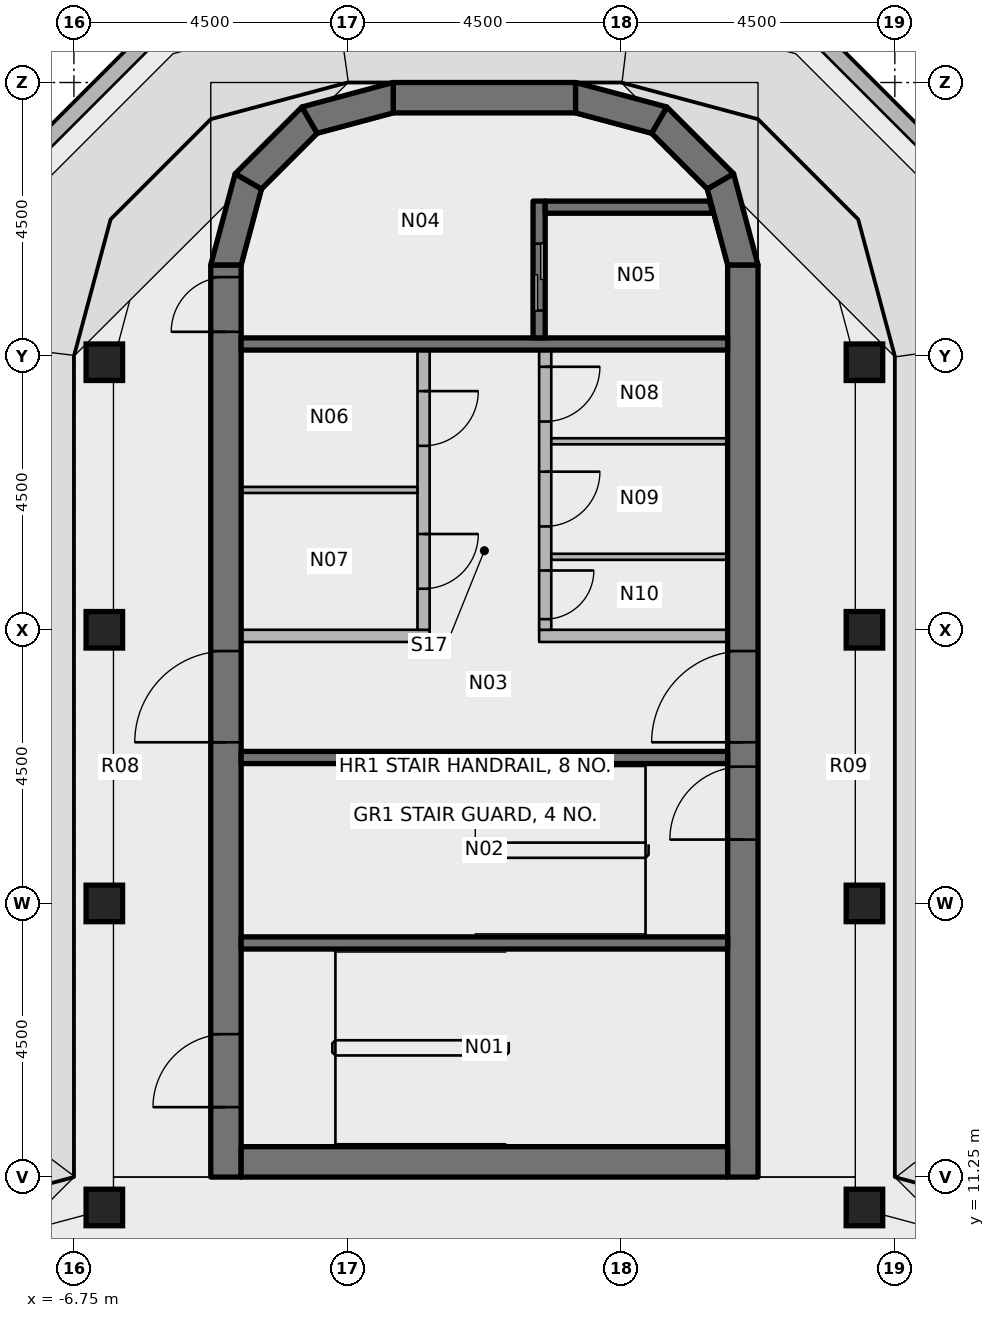
"""IFC4 building model, lengths in metres.
Left out: names, types, materials, properties, quantities, classifications, styles, units other than length and angle.
Written with IfcOpenShell. Run it as: python <this file> out.ifc"""

import sys

from ifc_helpers import new_model, si_unit, direction, frame, frame_2d, origin, origin_2d, place, context, subcontext, project, spatial, polyline, rectangle, outline, extrude, element, fill, save


model = new_model("IFC4")
c1 = context("Model", 3, precision=1e-05, world=origin(), true_north=direction((0.0, 1.0)))
c2 = subcontext(c1, "Body", "Model", "MODEL_VIEW")
j1 = project(units=[si_unit("LENGTHUNIT", "METRE"), si_unit("PLANEANGLEUNIT", "RADIAN")], contexts=[c1])
p1 = place(None, origin())
s1 = spatial("IfcSite", under=j1, at=p1, CompositionType="ELEMENT")
p2 = place(p1, origin())
s2 = spatial("IfcBuilding", under=s1, at=p2, CompositionType="ELEMENT")
p3 = place(p2, frame((0.0, 0.0, 302.4)))
s3 = spatial("IfcBuildingStorey", under=s2, at=p3, CompositionType="ELEMENT", Elevation=302.4)
for number, where, z_axis, x_axis in (
    (1, (-6.25, 10.75, 0.0), (0.0, 0.0, 1.0), (1.0, 0.0, 0.0)),
    (2, (-6.25, 15.75, 0.0), (0.0, 0.0, 1.0), (1.0, 0.0, 0.0)),
    (3, (-6.25, 20.25, 0.0), (0.0, 0.0, 1.0), (1.0, 0.0, 0.0)),
    (4, (-6.25, 24.65, 0.0), (0.0, 0.0, 1.0), (1.0, 0.0, 0.0)),
    (5, (6.25, 10.75, 0.0), (0.0, 0.0, 1.0), (1.0, 0.0, 0.0)),
    (6, (6.25, 15.75, 0.0), (0.0, 0.0, 1.0), (1.0, 0.0, 0.0)),
    (7, (6.25, 20.25, 0.0), (0.0, 0.0, 1.0), (1.0, 0.0, 0.0)),
    (8, (6.25, 24.65, 0.0), (0.0, 0.0, 1.0), (1.0, 0.0, 0.0)),
):
    element("IfcColumn", number, at=place(p3, frame(where, z_axis=z_axis, x_axis=x_axis)), inside=s3, PredefinedType="COLUMN", context=c2, shape_type="SweptSolid", body=[
        extrude(rectangle(XDim=0.6, YDim=0.6, at=origin_2d()), origin(), (0.0, 0.0, 1.0), 3.45),
    ])
p4 = place(p3, frame((-4.25, 11.25, 0.0), z_axis=(0.0, 0.0, 1.0), x_axis=(0.0, 1.0, 0.0)))
e9 = element("IfcWall", 9, at=p4, inside=s3, PredefinedType="SHEAR", context=c2, shape_type="SweptSolid", body=[
    extrude(rectangle(XDim=15.0, YDim=0.5, at=frame_2d((7.5, 0.0))), origin(), (0.0, 0.0, 1.0), 3.6),
])
p5 = place(p4, frame((7.15, 0.0, 0.0)))
e10 = element("IfcOpeningElement", 10, at=p5, cuts=e9, PredefinedType="OPENING", context=c2, shape_type="SweptSolid", body=[
    extrude(rectangle(XDim=1.5, YDim=2.3, at=frame_2d((0.75, 1.15))), frame((0.0, 0.26, 0.0), z_axis=(0.0, -1.0, 0.0), x_axis=(1.0, 0.0, 0.0)), (0.0, 0.0, 1.0), 0.52),
])
p6 = place(p4, frame((13.9, 0.0, 0.0)))
e11 = element("IfcOpeningElement", 11, at=p6, cuts=e9, PredefinedType="OPENING", context=c2, shape_type="SweptSolid", body=[
    extrude(rectangle(XDim=0.9, YDim=2.1, at=frame_2d((0.45, 1.05))), frame((0.0, 0.26, 0.0), z_axis=(0.0, -1.0, 0.0), x_axis=(1.0, 0.0, 0.0)), (0.0, 0.0, 1.0), 0.52),
])
p7 = place(p4, frame((1.15, 0.0, 0.0)))
e12 = element("IfcOpeningElement", 12, at=p7, cuts=e9, PredefinedType="OPENING", context=c2, shape_type="SweptSolid", body=[
    extrude(rectangle(XDim=1.2, YDim=2.1, at=frame_2d((0.6, 1.05))), frame((0.0, 0.26, 0.0), z_axis=(0.0, -1.0, 0.0), x_axis=(1.0, 0.0, 0.0)), (0.0, 0.0, 1.0), 0.52),
])
p8 = place(p3, frame((4.25, 11.25, 0.0), z_axis=(0.0, 0.0, 1.0), x_axis=(0.0, 1.0, 0.0)))
e13 = element("IfcWall", 13, at=p8, inside=s3, PredefinedType="SHEAR", context=c2, shape_type="SweptSolid", body=[
    extrude(rectangle(XDim=15.0, YDim=0.5, at=frame_2d((7.5, 0.0))), origin(), (0.0, 0.0, 1.0), 3.6),
])
p9 = place(p8, frame((7.15, 0.0, 0.0)))
e14 = element("IfcOpeningElement", 14, at=p9, cuts=e13, PredefinedType="OPENING", context=c2, shape_type="SweptSolid", body=[
    extrude(rectangle(XDim=1.5, YDim=2.3, at=frame_2d((0.75, 1.15))), frame((0.0, 0.26, 0.0), z_axis=(0.0, -1.0, 0.0), x_axis=(1.0, 0.0, 0.0)), (0.0, 0.0, 1.0), 0.52),
])
p10 = place(p8, frame((5.55, 0.0, 0.0)))
e15 = element("IfcOpeningElement", 15, at=p10, cuts=e13, PredefinedType="OPENING", context=c2, shape_type="SweptSolid", body=[
    extrude(rectangle(XDim=1.2, YDim=2.1, at=frame_2d((0.6, 1.05))), frame((0.0, 0.26, 0.0), z_axis=(0.0, -1.0, 0.0), x_axis=(1.0, 0.0, 0.0)), (0.0, 0.0, 1.0), 0.52),
])
p11 = place(p3, frame((-4.0, 11.5, 0.0), z_axis=(0.0, 0.0, 1.0), x_axis=(1.0, 0.0, 0.0)))
e16 = element("IfcWall", 16, at=p11, inside=s3, PredefinedType="SHEAR", context=c2, shape_type="SweptSolid", body=[
    extrude(rectangle(XDim=8.0, YDim=0.5, at=frame_2d((4.0, 0.0))), origin(), (0.0, 0.0, 1.0), 3.6),
])
p12 = place(p3, frame((-1.5, 29.0, 0.0), z_axis=(0.0, 0.0, 1.0), x_axis=(1.0, 0.0, 0.0)))
e17 = element("IfcWall", 17, at=p12, inside=s3, PredefinedType="SHEAR", context=c2, shape_type="SweptSolid", body=[
    extrude(rectangle(XDim=3.0, YDim=0.5, at=frame_2d((1.5, 0.0))), origin(), (0.0, 0.0, 1.0), 3.6),
])
p13 = place(p3, origin())
e18 = element("IfcWall", 18, at=p13, inside=s3, PredefinedType="SHEAR", context=c2, shape_type="SweptSolid", body=[
    extrude(outline(polyline([(-4.5, 26.25), (-4.098, 27.75), (-3.665, 27.5), (-4.0, 26.25), (-4.5, 26.25)])), origin(), (0.0, 0.0, 1.0), 3.6),
])
p14 = place(p3, origin())
e19 = element("IfcWall", 19, at=p14, inside=s3, PredefinedType="SHEAR", context=c2, shape_type="SweptSolid", body=[
    extrude(outline(polyline([(-4.098, 27.75), (-3.0, 28.848), (-2.75, 28.415), (-3.665, 27.5), (-4.098, 27.75)])), origin(), (0.0, 0.0, 1.0), 3.6),
])
p15 = place(p3, origin())
e20 = element("IfcWall", 20, at=p15, inside=s3, PredefinedType="SHEAR", context=c2, shape_type="SweptSolid", body=[
    extrude(outline(polyline([(-3.0, 28.848), (-1.5, 29.25), (-1.5, 28.75), (-2.75, 28.415), (-3.0, 28.848)])), origin(), (0.0, 0.0, 1.0), 3.6),
])
p16 = place(p3, origin())
e21 = element("IfcWall", 21, at=p16, inside=s3, PredefinedType="SHEAR", context=c2, shape_type="SweptSolid", body=[
    extrude(outline(polyline([(4.5, 26.25), (4.098, 27.75), (3.665, 27.5), (4.0, 26.25), (4.5, 26.25)])), origin(), (0.0, 0.0, 1.0), 3.6),
])
p17 = place(p3, origin())
e22 = element("IfcWall", 22, at=p17, inside=s3, PredefinedType="SHEAR", context=c2, shape_type="SweptSolid", body=[
    extrude(outline(polyline([(4.098, 27.75), (3.0, 28.848), (2.75, 28.415), (3.665, 27.5), (4.098, 27.75)])), origin(), (0.0, 0.0, 1.0), 3.6),
])
p18 = place(p3, origin())
e23 = element("IfcWall", 23, at=p18, inside=s3, PredefinedType="SHEAR", context=c2, shape_type="SweptSolid", body=[
    extrude(outline(polyline([(3.0, 28.848), (1.5, 29.25), (1.5, 28.75), (2.75, 28.415), (3.0, 28.848)])), origin(), (0.0, 0.0, 1.0), 3.6),
])
p19 = place(p3, origin())
e24 = element("IfcWall", 24, at=p19, inside=s3, PredefinedType="PARAPET", context=c2, shape_type="SweptSolid", body=[
    extrude(outline(polyline([(-7.743, 27.921), (-5.421, 30.243), (-5.292, 30.019), (-7.519, 27.792), (-7.743, 27.921)])), origin(), (0.0, 0.0, 1.0), 1.22),
])
p20 = place(p3, origin())
e25 = element("IfcWall", 25, at=p20, inside=s3, PredefinedType="PARAPET", context=c2, shape_type="SweptSolid", body=[
    extrude(outline(polyline([(5.421, 30.243), (7.743, 27.921), (7.519, 27.792), (5.292, 30.019), (5.421, 30.243)])), origin(), (0.0, 0.0, 1.0), 1.22),
])
p21 = place(p3, frame((-4.0, 24.95, 0.0), z_axis=(0.0, 0.0, 1.0), x_axis=(1.0, 0.0, 0.0)))
e26 = element("IfcWall", 26, at=p21, inside=s3, PredefinedType="SHEAR", context=c2, shape_type="SweptSolid", body=[
    extrude(rectangle(XDim=8.0, YDim=0.2, at=frame_2d((4.0, 0.0))), origin(), (0.0, 0.0, 1.0), 3.45),
])
p22 = place(p3, frame((0.9, 27.3, 0.0), z_axis=(0.0, 0.0, 1.0), x_axis=(0.0, -1.0, 0.0)))
e27 = element("IfcWall", 27, at=p22, inside=s3, PredefinedType="SHEAR", context=c2, shape_type="SweptSolid", body=[
    extrude(rectangle(XDim=2.25, YDim=0.2, at=frame_2d((1.125, 0.0))), origin(), (0.0, 0.0, 1.0), 3.45),
])
p23 = place(p22, frame((0.7, 0.0, 0.0)))
e28 = element("IfcOpeningElement", 28, at=p23, cuts=e27, PredefinedType="OPENING", context=c2, shape_type="SweptSolid", body=[
    extrude(rectangle(XDim=1.1, YDim=2.3, at=frame_2d((0.55, 1.15))), frame((0.0, 0.11, 0.0), z_axis=(0.0, -1.0, 0.0), x_axis=(1.0, 0.0, 0.0)), (0.0, 0.0, 1.0), 0.22),
])
p24 = place(p3, origin())
e29 = element("IfcWall", 29, at=p24, inside=s3, PredefinedType="SHEAR", context=c2, shape_type="SweptSolid", body=[
    extrude(outline(polyline([(1.0, 27.1), (3.755, 27.1), (3.701, 27.3), (1.0, 27.3), (1.0, 27.1)])), origin(), (0.0, 0.0, 1.0), 3.45),
])
for number, where, z_axis, x_axis in (
    (30, (-4.0, 18.15, 0.0), (0.0, 0.0, 1.0), (1.0, 0.0, 0.0)),
    (31, (-4.0, 15.1, 0.0), (0.0, 0.0, 1.0), (1.0, 0.0, 0.0)),
):
    element("IfcWall", number, at=place(p3, frame(where, z_axis=z_axis, x_axis=x_axis)), inside=s3, PredefinedType="SHEAR", context=c2, shape_type="SweptSolid", body=[
        extrude(rectangle(XDim=8.0, YDim=0.2, at=frame_2d((4.0, 0.0))), origin(), (0.0, 0.0, 1.0), 3.45),
    ])
p25 = place(p3, frame((-4.0, 20.15, 0.0), z_axis=(0.0, 0.0, 1.0), x_axis=(1.0, 0.0, 0.0)))
e32 = element("IfcWall", 32, at=p25, inside=s3, PredefinedType="PARTITIONING", context=c2, shape_type="SweptSolid", body=[
    extrude(rectangle(XDim=3.1, YDim=0.2, at=frame_2d((1.55, 0.0))), origin(), (0.0, 0.0, 1.0), 3.45),
])
p26 = place(p3, frame((-1.0, 24.85, 0.0), z_axis=(0.0, 0.0, 1.0), x_axis=(0.0, -1.0, 0.0)))
e33 = element("IfcWall", 33, at=p26, inside=s3, PredefinedType="PARTITIONING", context=c2, shape_type="SweptSolid", body=[
    extrude(rectangle(XDim=4.6, YDim=0.2, at=frame_2d((2.3, 0.0))), origin(), (0.0, 0.0, 1.0), 3.45),
])
p27 = place(p26, frame((0.675, 0.0, 0.0)))
e34 = element("IfcOpeningElement", 34, at=p27, cuts=e33, PredefinedType="OPENING", context=c2, shape_type="SweptSolid", body=[
    extrude(rectangle(XDim=0.9, YDim=2.1, at=frame_2d((0.45, 1.05))), frame((0.0, 0.11, 0.0), z_axis=(0.0, -1.0, 0.0), x_axis=(1.0, 0.0, 0.0)), (0.0, 0.0, 1.0), 0.22),
])
p28 = place(p26, frame((3.025, 0.0, 0.0)))
e35 = element("IfcOpeningElement", 35, at=p28, cuts=e33, PredefinedType="OPENING", context=c2, shape_type="SweptSolid", body=[
    extrude(rectangle(XDim=0.9, YDim=2.1, at=frame_2d((0.45, 1.05))), frame((0.0, 0.11, 0.0), z_axis=(0.0, -1.0, 0.0), x_axis=(1.0, 0.0, 0.0)), (0.0, 0.0, 1.0), 0.22),
])
p29 = place(p3, frame((0.9, 20.15, 0.0), z_axis=(0.0, 0.0, 1.0), x_axis=(1.0, 0.0, 0.0)))
e36 = element("IfcWall", 36, at=p29, inside=s3, PredefinedType="PARTITIONING", context=c2, shape_type="SweptSolid", body=[
    extrude(rectangle(XDim=3.1, YDim=0.2, at=frame_2d((1.55, 0.0))), origin(), (0.0, 0.0, 1.0), 3.45),
])
p30 = place(p3, frame((1.0, 24.85, 0.0), z_axis=(0.0, 0.0, 1.0), x_axis=(0.0, -1.0, 0.0)))
e37 = element("IfcWall", 37, at=p30, inside=s3, PredefinedType="PARTITIONING", context=c2, shape_type="SweptSolid", body=[
    extrude(rectangle(XDim=4.6, YDim=0.2, at=frame_2d((2.3, 0.0))), origin(), (0.0, 0.0, 1.0), 3.45),
])
p31 = place(p30, frame((0.275, 0.0, 0.0)))
e38 = element("IfcOpeningElement", 38, at=p31, cuts=e37, PredefinedType="OPENING", context=c2, shape_type="SweptSolid", body=[
    extrude(rectangle(XDim=0.9, YDim=2.1, at=frame_2d((0.45, 1.05))), frame((0.0, 0.11, 0.0), z_axis=(0.0, -1.0, 0.0), x_axis=(1.0, 0.0, 0.0)), (0.0, 0.0, 1.0), 0.22),
])
p32 = place(p30, frame((2.0, 0.0, 0.0)))
e39 = element("IfcOpeningElement", 39, at=p32, cuts=e37, PredefinedType="OPENING", context=c2, shape_type="SweptSolid", body=[
    extrude(rectangle(XDim=0.9, YDim=2.1, at=frame_2d((0.45, 1.05))), frame((0.0, 0.11, 0.0), z_axis=(0.0, -1.0, 0.0), x_axis=(1.0, 0.0, 0.0)), (0.0, 0.0, 1.0), 0.22),
])
p33 = place(p30, frame((3.625, 0.0, 0.0)))
e40 = element("IfcOpeningElement", 40, at=p33, cuts=e37, PredefinedType="OPENING", context=c2, shape_type="SweptSolid", body=[
    extrude(rectangle(XDim=0.8, YDim=2.1, at=frame_2d((0.4, 1.05))), frame((0.0, 0.11, 0.0), z_axis=(0.0, -1.0, 0.0), x_axis=(1.0, 0.0, 0.0)), (0.0, 0.0, 1.0), 0.22),
])
for number, where, z_axis, x_axis in (
    (41, (-4.0, 22.55, 0.0), (0.0, 0.0, 1.0), (1.0, 0.0, 0.0)),
    (42, (1.1, 23.35, 0.0), (0.0, 0.0, 1.0), (1.0, 0.0, 0.0)),
    (43, (1.1, 21.45, 0.0), (0.0, 0.0, 1.0), (1.0, 0.0, 0.0)),
):
    element("IfcWall", number, at=place(p3, frame(where, z_axis=z_axis, x_axis=x_axis)), inside=s3, PredefinedType="PARTITIONING", context=c2, shape_type="SweptSolid", body=[
        extrude(rectangle(XDim=2.9, YDim=0.1, at=frame_2d((1.45, 0.0))), origin(), (0.0, 0.0, 1.0), 3.45),
    ])
p34 = place(p5, origin())
e44 = element("IfcDoor", 44, at=p34, inside=s3, OperationType="DOUBLE_DOOR_SINGLE_SWING", PredefinedType="DOOR", context=c2, shape_type="SweptSolid", body=[
    extrude(rectangle(XDim=1.5, YDim=2.3, at=frame_2d((0.75, 1.15))), frame((0.0, 0.025, 0.0), z_axis=(0.0, -1.0, 0.0), x_axis=(1.0, 0.0, 0.0)), (0.0, 0.0, 1.0), 0.05),
])
fill(e10, e44)
p35 = place(p9, origin())
e45 = element("IfcDoor", 45, at=p35, inside=s3, OperationType="DOUBLE_DOOR_SINGLE_SWING", PredefinedType="DOOR", context=c2, shape_type="SweptSolid", body=[
    extrude(rectangle(XDim=1.5, YDim=2.3, at=frame_2d((0.75, 1.15))), frame((0.0, 0.025, 0.0), z_axis=(0.0, -1.0, 0.0), x_axis=(1.0, 0.0, 0.0)), (0.0, 0.0, 1.0), 0.05),
])
fill(e14, e45)
p36 = place(p6, origin())
e46 = element("IfcDoor", 46, at=p36, inside=s3, OperationType="SINGLE_SWING_RIGHT", PredefinedType="DOOR", context=c2, shape_type="SweptSolid", body=[
    extrude(rectangle(XDim=0.9, YDim=2.1, at=frame_2d((0.45, 1.05))), frame((0.0, 0.025, 0.0), z_axis=(0.0, -1.0, 0.0), x_axis=(1.0, 0.0, 0.0)), (0.0, 0.0, 1.0), 0.05),
])
fill(e11, e46)
p37 = place(p10, origin())
e47 = element("IfcDoor", 47, at=p37, inside=s3, OperationType="SINGLE_SWING_RIGHT", PredefinedType="DOOR", context=c2, shape_type="SweptSolid", body=[
    extrude(rectangle(XDim=1.2, YDim=2.1, at=frame_2d((0.6, 1.05))), frame((0.0, 0.025, 0.0), z_axis=(0.0, -1.0, 0.0), x_axis=(1.0, 0.0, 0.0)), (0.0, 0.0, 1.0), 0.05),
])
fill(e15, e47)
p38 = place(p7, origin())
e48 = element("IfcDoor", 48, at=p38, inside=s3, OperationType="SINGLE_SWING_RIGHT", PredefinedType="DOOR", context=c2, shape_type="SweptSolid", body=[
    extrude(rectangle(XDim=1.2, YDim=2.1, at=frame_2d((0.6, 1.05))), frame((0.0, 0.025, 0.0), z_axis=(0.0, -1.0, 0.0), x_axis=(1.0, 0.0, 0.0)), (0.0, 0.0, 1.0), 0.05),
])
fill(e12, e48)
p39 = place(p23, origin())
e49 = element("IfcDoor", 49, at=p39, inside=s3, OperationType="DOUBLE_DOOR_SLIDING", PredefinedType="DOOR", context=c2, shape_type="SweptSolid", body=[
    extrude(rectangle(XDim=1.1, YDim=2.3, at=frame_2d((0.55, 1.15))), frame((0.0, 0.025, 0.0), z_axis=(0.0, -1.0, 0.0), x_axis=(1.0, 0.0, 0.0)), (0.0, 0.0, 1.0), 0.05),
])
fill(e28, e49)
p40 = place(p27, origin())
e50 = element("IfcDoor", 50, at=p40, inside=s3, OperationType="SINGLE_SWING_LEFT", PredefinedType="DOOR", context=c2, shape_type="SweptSolid", body=[
    extrude(rectangle(XDim=0.9, YDim=2.1, at=frame_2d((0.45, 1.05))), frame((0.0, 0.025, 0.0), z_axis=(0.0, -1.0, 0.0), x_axis=(1.0, 0.0, 0.0)), (0.0, 0.0, 1.0), 0.05),
])
fill(e34, e50)
p41 = place(p28, origin())
e51 = element("IfcDoor", 51, at=p41, inside=s3, OperationType="SINGLE_SWING_RIGHT", PredefinedType="DOOR", context=c2, shape_type="SweptSolid", body=[
    extrude(rectangle(XDim=0.9, YDim=2.1, at=frame_2d((0.45, 1.05))), frame((0.0, 0.025, 0.0), z_axis=(0.0, -1.0, 0.0), x_axis=(1.0, 0.0, 0.0)), (0.0, 0.0, 1.0), 0.05),
])
fill(e35, e51)
p42 = place(p31, origin())
e52 = element("IfcDoor", 52, at=p42, inside=s3, OperationType="SINGLE_SWING_LEFT", PredefinedType="DOOR", context=c2, shape_type="SweptSolid", body=[
    extrude(rectangle(XDim=0.9, YDim=2.1, at=frame_2d((0.45, 1.05))), frame((0.0, 0.025, 0.0), z_axis=(0.0, -1.0, 0.0), x_axis=(1.0, 0.0, 0.0)), (0.0, 0.0, 1.0), 0.05),
])
fill(e38, e52)
p43 = place(p32, origin())
e53 = element("IfcDoor", 53, at=p43, inside=s3, OperationType="SINGLE_SWING_LEFT", PredefinedType="DOOR", context=c2, shape_type="SweptSolid", body=[
    extrude(rectangle(XDim=0.9, YDim=2.1, at=frame_2d((0.45, 1.05))), frame((0.0, 0.025, 0.0), z_axis=(0.0, -1.0, 0.0), x_axis=(1.0, 0.0, 0.0)), (0.0, 0.0, 1.0), 0.05),
])
fill(e39, e53)
p44 = place(p33, origin())
e54 = element("IfcDoor", 54, at=p44, inside=s3, OperationType="SINGLE_SWING_RIGHT", PredefinedType="DOOR", context=c2, shape_type="SweptSolid", body=[
    extrude(rectangle(XDim=0.8, YDim=2.1, at=frame_2d((0.4, 1.05))), frame((0.0, 0.025, 0.0), z_axis=(0.0, -1.0, 0.0), x_axis=(1.0, 0.0, 0.0)), (0.0, 0.0, 1.0), 0.05),
])
fill(e40, e54)
save(model, sys.argv[1])
